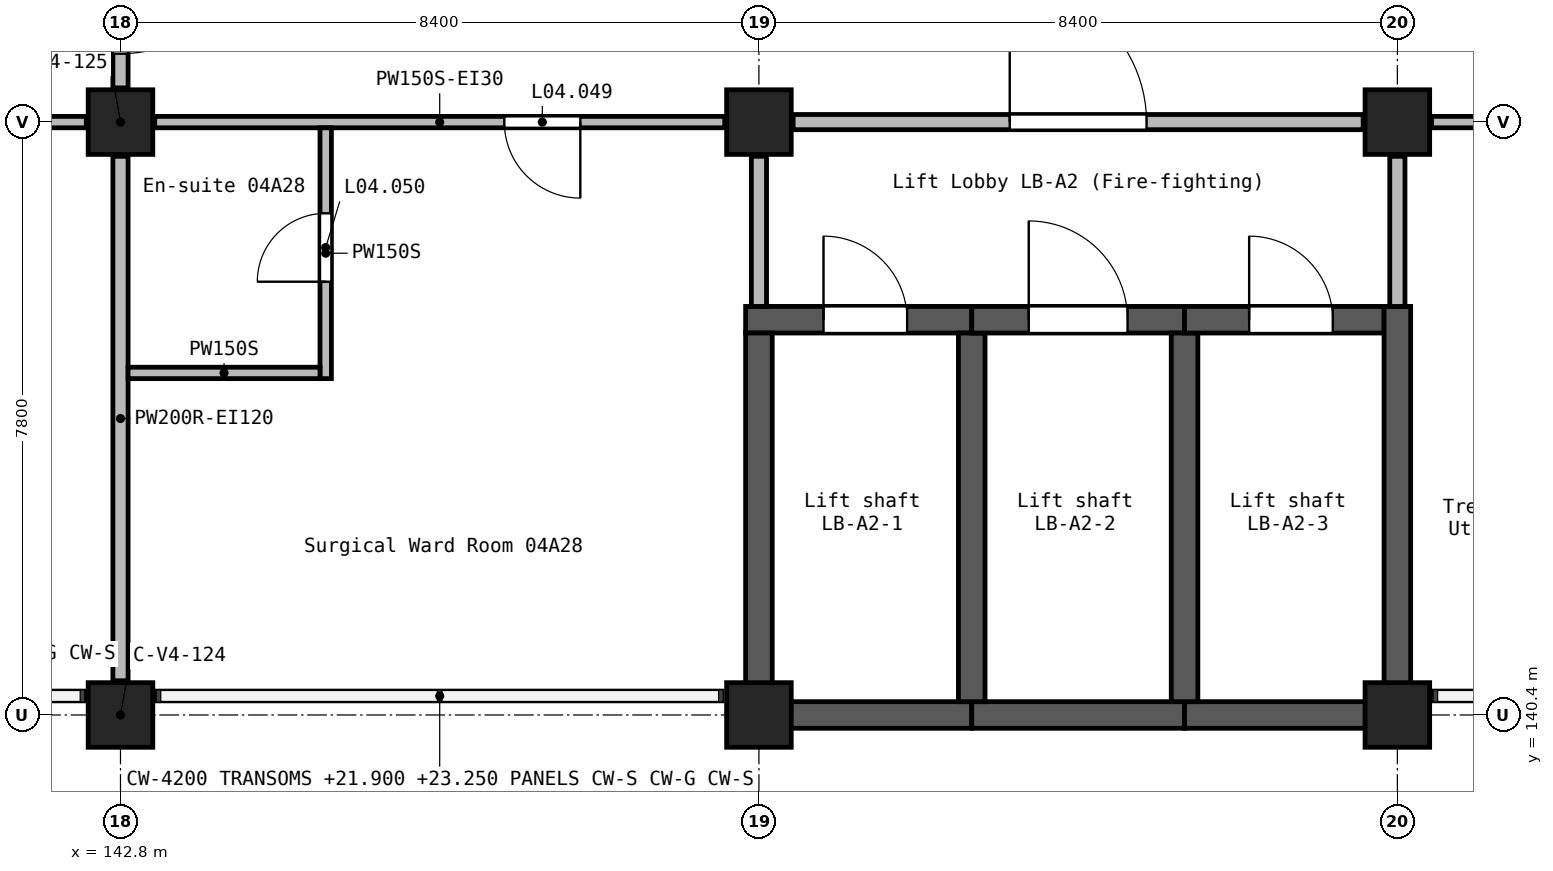
"""IFC4 building model, lengths in metres.
Left out: names, types, materials, properties, quantities, classifications, styles, units other than length and angle.
Written with IfcOpenShell. Run it as: python <this file> out.ifc"""

import sys

from ifc_helpers import new_model, si_unit, direction, frame, frame_2d, origin, origin_2d, place, context, subcontext, project, spatial, rectangle, extrude, element, fill, save


model = new_model("IFC4")
c1 = context("Model", 3, precision=1e-05, world=origin(), true_north=direction((0.0, 1.0)))
c2 = subcontext(c1, "Body", "Model", "MODEL_VIEW")
j1 = project(units=[si_unit("LENGTHUNIT", "METRE"), si_unit("PLANEANGLEUNIT", "RADIAN")], contexts=[c1])
p1 = place(None, origin())
s1 = spatial("IfcSite", under=j1, at=p1, CompositionType="ELEMENT")
p2 = place(p1, origin())
s2 = spatial("IfcBuilding", under=s1, at=p2, CompositionType="ELEMENT")
p3 = place(p2, frame((0.0, 0.0, 21.0)))
s3 = spatial("IfcBuildingStorey", under=s2, at=p3, CompositionType="ELEMENT", Elevation=21.0)
for number, where, z_axis, x_axis in (
    (1, (142.8, 140.4, 0.0), (0.0, 0.0, 1.0), (1.0, 0.0, 0.0)),
    (2, (142.8, 148.2, 0.0), (0.0, 0.0, 1.0), (1.0, 0.0, 0.0)),
    (3, (151.2, 140.4, 0.0), (0.0, 0.0, 1.0), (1.0, 0.0, 0.0)),
    (4, (151.2, 148.2, 0.0), (0.0, 0.0, 1.0), (1.0, 0.0, 0.0)),
    (5, (159.6, 140.4, 0.0), (0.0, 0.0, 1.0), (1.0, 0.0, 0.0)),
    (6, (159.6, 148.2, 0.0), (0.0, 0.0, 1.0), (1.0, 0.0, 0.0)),
):
    element("IfcColumn", number, at=place(p3, frame(where, z_axis=z_axis, x_axis=x_axis)), inside=s3, PredefinedType="COLUMN", context=c2, shape_type="SweptSolid", body=[
        extrude(rectangle(XDim=0.85, YDim=0.85, at=origin_2d()), origin(), (0.0, 0.0, 1.0), 3.9),
    ])
p4 = place(p3, frame((151.025, 145.6, 0.0), z_axis=(0.0, 0.0, 1.0), x_axis=(1.0, 0.0, 0.0)))
e7 = element("IfcWall", 7, at=p4, inside=s3, PredefinedType="SHEAR", context=c2, shape_type="SweptSolid", body=[
    extrude(rectangle(XDim=2.975, YDim=0.35, at=frame_2d((1.488, 0.0))), origin(), (0.0, 0.0, 1.0), 3.9),
])
p5 = place(p4, frame((1.025, 0.0, 0.0)))
e8 = element("IfcOpeningElement", 8, at=p5, cuts=e7, PredefinedType="OPENING", context=c2, shape_type="SweptSolid", body=[
    extrude(rectangle(XDim=1.1, YDim=2.1, at=frame_2d((0.55, 1.05))), frame((0.0, 0.185, 0.0), z_axis=(0.0, -1.0, 0.0), x_axis=(1.0, 0.0, 0.0)), (0.0, 0.0, 1.0), 0.37),
])
p6 = place(p3, frame((151.2, 140.225, 0.0), z_axis=(0.0, 0.0, 1.0), x_axis=(0.0, 1.0, 0.0)))
e9 = element("IfcWall", 9, at=p6, inside=s3, PredefinedType="SHEAR", context=c2, shape_type="SweptSolid", body=[
    extrude(rectangle(XDim=5.2, YDim=0.35, at=frame_2d((2.6, 0.0))), origin(), (0.0, 0.0, 1.0), 3.9),
])
p7 = place(p3, frame((151.375, 140.4, 0.0), z_axis=(0.0, 0.0, 1.0), x_axis=(1.0, 0.0, 0.0)))
e10 = element("IfcWall", 10, at=p7, inside=s3, PredefinedType="SHEAR", context=c2, shape_type="SweptSolid", body=[
    extrude(rectangle(XDim=2.625, YDim=0.35, at=frame_2d((1.312, 0.0))), origin(), (0.0, 0.0, 1.0), 3.9),
])
p8 = place(p3, frame((154.0, 140.4, 0.0), z_axis=(0.0, 0.0, 1.0), x_axis=(1.0, 0.0, 0.0)))
e11 = element("IfcWall", 11, at=p8, inside=s3, PredefinedType="SHEAR", context=c2, shape_type="SweptSolid", body=[
    extrude(rectangle(XDim=2.8, YDim=0.35, at=frame_2d((1.4, 0.0))), origin(), (0.0, 0.0, 1.0), 3.9),
])
p9 = place(p3, frame((154.0, 140.575, 0.0), z_axis=(0.0, 0.0, 1.0), x_axis=(0.0, 1.0, 0.0)))
e12 = element("IfcWall", 12, at=p9, inside=s3, PredefinedType="SHEAR", context=c2, shape_type="SweptSolid", body=[
    extrude(rectangle(XDim=4.85, YDim=0.35, at=frame_2d((2.425, 0.0))), origin(), (0.0, 0.0, 1.0), 3.9),
])
p10 = place(p3, frame((154.0, 145.6, 0.0), z_axis=(0.0, 0.0, 1.0), x_axis=(1.0, 0.0, 0.0)))
e13 = element("IfcWall", 13, at=p10, inside=s3, PredefinedType="SHEAR", context=c2, shape_type="SweptSolid", body=[
    extrude(rectangle(XDim=2.8, YDim=0.35, at=frame_2d((1.4, 0.0))), origin(), (0.0, 0.0, 1.0), 3.9),
])
p11 = place(p10, frame((0.75, 0.0, 0.0)))
e14 = element("IfcOpeningElement", 14, at=p11, cuts=e13, PredefinedType="OPENING", context=c2, shape_type="SweptSolid", body=[
    extrude(rectangle(XDim=1.3, YDim=2.1, at=frame_2d((0.65, 1.05))), frame((0.0, 0.185, 0.0), z_axis=(0.0, -1.0, 0.0), x_axis=(1.0, 0.0, 0.0)), (0.0, 0.0, 1.0), 0.37),
])
p12 = place(p3, frame((156.8, 140.4, 0.0), z_axis=(0.0, 0.0, 1.0), x_axis=(1.0, 0.0, 0.0)))
e15 = element("IfcWall", 15, at=p12, inside=s3, PredefinedType="SHEAR", context=c2, shape_type="SweptSolid", body=[
    extrude(rectangle(XDim=2.625, YDim=0.35, at=frame_2d((1.312, 0.0))), origin(), (0.0, 0.0, 1.0), 3.9),
])
p13 = place(p3, frame((156.8, 140.575, 0.0), z_axis=(0.0, 0.0, 1.0), x_axis=(0.0, 1.0, 0.0)))
e16 = element("IfcWall", 16, at=p13, inside=s3, PredefinedType="SHEAR", context=c2, shape_type="SweptSolid", body=[
    extrude(rectangle(XDim=4.85, YDim=0.35, at=frame_2d((2.425, 0.0))), origin(), (0.0, 0.0, 1.0), 3.9),
])
p14 = place(p3, frame((156.8, 145.6, 0.0), z_axis=(0.0, 0.0, 1.0), x_axis=(1.0, 0.0, 0.0)))
e17 = element("IfcWall", 17, at=p14, inside=s3, PredefinedType="SHEAR", context=c2, shape_type="SweptSolid", body=[
    extrude(rectangle(XDim=2.625, YDim=0.35, at=frame_2d((1.312, 0.0))), origin(), (0.0, 0.0, 1.0), 3.9),
])
p15 = place(p14, frame((0.85, 0.0, 0.0)))
e18 = element("IfcOpeningElement", 18, at=p15, cuts=e17, PredefinedType="OPENING", context=c2, shape_type="SweptSolid", body=[
    extrude(rectangle(XDim=1.1, YDim=2.1, at=frame_2d((0.55, 1.05))), frame((0.0, 0.185, 0.0), z_axis=(0.0, -1.0, 0.0), x_axis=(1.0, 0.0, 0.0)), (0.0, 0.0, 1.0), 0.37),
])
p16 = place(p3, frame((159.6, 140.225, 0.0), z_axis=(0.0, 0.0, 1.0), x_axis=(0.0, 1.0, 0.0)))
e19 = element("IfcWall", 19, at=p16, inside=s3, PredefinedType="SHEAR", context=c2, shape_type="SweptSolid", body=[
    extrude(rectangle(XDim=5.55, YDim=0.35, at=frame_2d((2.775, 0.0))), origin(), (0.0, 0.0, 1.0), 3.9),
])
p17 = place(p3, frame((142.8, 151.35, 0.0), z_axis=(0.0, 0.0, 1.0), x_axis=(0.0, -1.0, 0.0)))
e20 = element("IfcWall", 20, at=p17, inside=s3, PredefinedType="SOLIDWALL", context=c2, shape_type="SweptSolid", body=[
    extrude(rectangle(XDim=2.7, YDim=0.2, at=frame_2d((1.35, 0.0))), origin(), (0.0, 0.0, 1.0), 3.6),
])
p18 = place(p17, frame((0.45, 0.0, 0.0)))
e21 = element("IfcOpeningElement", 21, at=p18, cuts=e20, PredefinedType="OPENING", context=c2, shape_type="SweptSolid", body=[
    extrude(rectangle(XDim=1.8, YDim=2.1, at=frame_2d((0.9, 1.05))), frame((0.0, 0.11, 0.0), z_axis=(0.0, -1.0, 0.0), x_axis=(1.0, 0.0, 0.0)), (0.0, 0.0, 1.0), 0.22),
])
p19 = place(p3, frame((142.8, 147.75, 0.0), z_axis=(0.0, 0.0, 1.0), x_axis=(0.0, -1.0, 0.0)))
e22 = element("IfcWall", 22, at=p19, inside=s3, PredefinedType="SOLIDWALL", context=c2, shape_type="SweptSolid", body=[
    extrude(rectangle(XDim=6.9, YDim=0.2, at=frame_2d((3.45, 0.0))), origin(), (0.0, 0.0, 1.0), 3.6),
])
p20 = place(p3, frame((151.65, 148.2, 0.0), z_axis=(0.0, 0.0, 1.0), x_axis=(1.0, 0.0, 0.0)))
e23 = element("IfcWall", 23, at=p20, inside=s3, PredefinedType="SOLIDWALL", context=c2, shape_type="SweptSolid", body=[
    extrude(rectangle(XDim=7.5, YDim=0.2, at=frame_2d((3.75, 0.0))), origin(), (0.0, 0.0, 1.0), 3.6),
])
p21 = place(p20, frame((2.85, 0.0, 0.0)))
e24 = element("IfcOpeningElement", 24, at=p21, cuts=e23, PredefinedType="OPENING", context=c2, shape_type="SweptSolid", body=[
    extrude(rectangle(XDim=1.8, YDim=2.1, at=frame_2d((0.9, 1.05))), frame((0.0, 0.11, 0.0), z_axis=(0.0, -1.0, 0.0), x_axis=(1.0, 0.0, 0.0)), (0.0, 0.0, 1.0), 0.22),
])
for number, where, z_axis, x_axis in (
    (25, (151.2, 145.775, 0.0), (0.0, 0.0, 1.0), (0.0, 1.0, 0.0)),
    (26, (159.6, 145.775, 0.0), (0.0, 0.0, 1.0), (0.0, 1.0, 0.0)),
):
    element("IfcWall", number, at=place(p3, frame(where, z_axis=z_axis, x_axis=x_axis)), inside=s3, PredefinedType="SOLIDWALL", context=c2, shape_type="SweptSolid", body=[
        extrude(rectangle(XDim=1.975, YDim=0.2, at=frame_2d((0.988, 0.0))), origin(), (0.0, 0.0, 1.0), 3.6),
    ])
p22 = place(p3, frame((150.75, 148.2, 0.0), z_axis=(0.0, 0.0, 1.0), x_axis=(-1.0, 0.0, 0.0)))
e27 = element("IfcWall", 27, at=p22, inside=s3, PredefinedType="PARTITIONING", context=c2, shape_type="SweptSolid", body=[
    extrude(rectangle(XDim=7.5, YDim=0.15, at=frame_2d((3.75, 0.0))), origin(), (0.0, 0.0, 1.0), 3.6),
])
p23 = place(p22, frame((1.9, 0.0, 0.0)))
e28 = element("IfcOpeningElement", 28, at=p23, cuts=e27, PredefinedType="OPENING", context=c2, shape_type="SweptSolid", body=[
    extrude(rectangle(XDim=1.0, YDim=2.1, at=frame_2d((0.5, 1.05))), frame((0.0, 0.085, 0.0), z_axis=(0.0, -1.0, 0.0), x_axis=(1.0, 0.0, 0.0)), (0.0, 0.0, 1.0), 0.17),
])
p24 = place(p3, frame((142.35, 148.2, 0.0), z_axis=(0.0, 0.0, 1.0), x_axis=(-1.0, 0.0, 0.0)))
e29 = element("IfcWall", 29, at=p24, inside=s3, PredefinedType="PARTITIONING", context=c2, shape_type="SweptSolid", body=[
    extrude(rectangle(XDim=7.5, YDim=0.15, at=frame_2d((3.75, 0.0))), origin(), (0.0, 0.0, 1.0), 3.6),
])
p25 = place(p24, frame((1.9, 0.0, 0.0)))
e30 = element("IfcOpeningElement", 30, at=p25, cuts=e29, PredefinedType="OPENING", context=c2, shape_type="SweptSolid", body=[
    extrude(rectangle(XDim=1.0, YDim=2.1, at=frame_2d((0.5, 1.05))), frame((0.0, 0.085, 0.0), z_axis=(0.0, -1.0, 0.0), x_axis=(1.0, 0.0, 0.0)), (0.0, 0.0, 1.0), 0.17),
])
p26 = place(p3, frame((160.05, 148.2, 0.0), z_axis=(0.0, 0.0, 1.0), x_axis=(1.0, 0.0, 0.0)))
e31 = element("IfcWall", 31, at=p26, inside=s3, PredefinedType="PARTITIONING", context=c2, shape_type="SweptSolid", body=[
    extrude(rectangle(XDim=3.675, YDim=0.15, at=frame_2d((1.837, 0.0))), origin(), (0.0, 0.0, 1.0), 3.6),
])
p27 = place(p26, frame((1.15, 0.0, 0.0)))
e32 = element("IfcOpeningElement", 32, at=p27, cuts=e31, PredefinedType="OPENING", context=c2, shape_type="SweptSolid", body=[
    extrude(rectangle(XDim=1.0, YDim=2.1, at=frame_2d((0.5, 1.05))), frame((0.0, 0.085, 0.0), z_axis=(0.0, -1.0, 0.0), x_axis=(1.0, 0.0, 0.0)), (0.0, 0.0, 1.0), 0.17),
])
p28 = place(p3, frame((145.5, 144.825, 0.0), z_axis=(0.0, 0.0, 1.0), x_axis=(0.0, 1.0, 0.0)))
e33 = element("IfcWall", 33, at=p28, inside=s3, PredefinedType="PARTITIONING", context=c2, shape_type="SweptSolid", body=[
    extrude(rectangle(XDim=3.3, YDim=0.15, at=frame_2d((1.65, 0.0))), origin(), (0.0, 0.0, 1.0), 3.6),
])
p29 = place(p28, frame((1.275, 0.0, 0.0)))
e34 = element("IfcOpeningElement", 34, at=p29, cuts=e33, PredefinedType="OPENING", context=c2, shape_type="SweptSolid", body=[
    extrude(rectangle(XDim=0.9, YDim=2.1, at=frame_2d((0.45, 1.05))), frame((0.0, 0.085, 0.0), z_axis=(0.0, -1.0, 0.0), x_axis=(1.0, 0.0, 0.0)), (0.0, 0.0, 1.0), 0.17),
])
p30 = place(p3, frame((142.9, 144.9, 0.0), z_axis=(0.0, 0.0, 1.0), x_axis=(1.0, 0.0, 0.0)))
e35 = element("IfcWall", 35, at=p30, inside=s3, PredefinedType="PARTITIONING", context=c2, shape_type="SweptSolid", body=[
    extrude(rectangle(XDim=2.525, YDim=0.15, at=frame_2d((1.263, 0.0))), origin(), (0.0, 0.0, 1.0), 3.6),
])
p31 = place(p18, origin())
e36 = element("IfcDoor", 36, at=p31, inside=s3, OperationType="DOUBLE_DOOR_SINGLE_SWING", PredefinedType="DOOR", context=c2, shape_type="SweptSolid", body=[
    extrude(rectangle(XDim=1.8, YDim=2.1, at=frame_2d((0.9, 1.05))), frame((0.0, 0.025, 0.0), z_axis=(0.0, -1.0, 0.0), x_axis=(1.0, 0.0, 0.0)), (0.0, 0.0, 1.0), 0.05),
])
fill(e21, e36)
p32 = place(p23, origin())
e37 = element("IfcDoor", 37, at=p32, inside=s3, OperationType="SINGLE_SWING_LEFT", PredefinedType="DOOR", context=c2, shape_type="SweptSolid", body=[
    extrude(rectangle(XDim=1.0, YDim=2.1, at=frame_2d((0.5, 1.05))), frame((0.0, 0.025, 0.0), z_axis=(0.0, -1.0, 0.0), x_axis=(1.0, 0.0, 0.0)), (0.0, 0.0, 1.0), 0.05),
])
fill(e28, e37)
p33 = place(p29, origin())
e38 = element("IfcDoor", 38, at=p33, inside=s3, OperationType="SINGLE_SWING_RIGHT", PredefinedType="DOOR", context=c2, shape_type="SweptSolid", body=[
    extrude(rectangle(XDim=0.9, YDim=2.1, at=frame_2d((0.45, 1.05))), frame((0.0, 0.025, 0.0), z_axis=(0.0, -1.0, 0.0), x_axis=(1.0, 0.0, 0.0)), (0.0, 0.0, 1.0), 0.05),
])
fill(e34, e38)
p34 = place(p21, frame((1.8, 0.0, 0.0), z_axis=(0.0, 0.0, 1.0), x_axis=(-1.0, 0.0, 0.0)))
e39 = element("IfcDoor", 39, at=p34, inside=s3, OperationType="DOUBLE_DOOR_SINGLE_SWING", PredefinedType="DOOR", context=c2, shape_type="SweptSolid", body=[
    extrude(rectangle(XDim=1.8, YDim=2.1, at=frame_2d((0.9, 1.05))), frame((0.0, 0.025, 0.0), z_axis=(0.0, -1.0, 0.0), x_axis=(1.0, 0.0, 0.0)), (0.0, 0.0, 1.0), 0.05),
])
fill(e24, e39)
p35 = place(p5, origin())
e40 = element("IfcDoor", 40, at=p35, inside=s3, OperationType="DOUBLE_DOOR_SLIDING", PredefinedType="DOOR", context=c2, shape_type="SweptSolid", body=[
    extrude(rectangle(XDim=1.1, YDim=2.1, at=frame_2d((0.55, 1.05))), frame((0.0, 0.025, 0.0), z_axis=(0.0, -1.0, 0.0), x_axis=(1.0, 0.0, 0.0)), (0.0, 0.0, 1.0), 0.05),
])
fill(e8, e40)
p36 = place(p11, origin())
e41 = element("IfcDoor", 41, at=p36, inside=s3, OperationType="DOUBLE_DOOR_SLIDING", PredefinedType="DOOR", context=c2, shape_type="SweptSolid", body=[
    extrude(rectangle(XDim=1.3, YDim=2.1, at=frame_2d((0.65, 1.05))), frame((0.0, 0.025, 0.0), z_axis=(0.0, -1.0, 0.0), x_axis=(1.0, 0.0, 0.0)), (0.0, 0.0, 1.0), 0.05),
])
fill(e14, e41)
p37 = place(p15, origin())
e42 = element("IfcDoor", 42, at=p37, inside=s3, OperationType="DOUBLE_DOOR_SLIDING", PredefinedType="DOOR", context=c2, shape_type="SweptSolid", body=[
    extrude(rectangle(XDim=1.1, YDim=2.1, at=frame_2d((0.55, 1.05))), frame((0.0, 0.025, 0.0), z_axis=(0.0, -1.0, 0.0), x_axis=(1.0, 0.0, 0.0)), (0.0, 0.0, 1.0), 0.05),
])
fill(e18, e42)
save(model, sys.argv[1])
